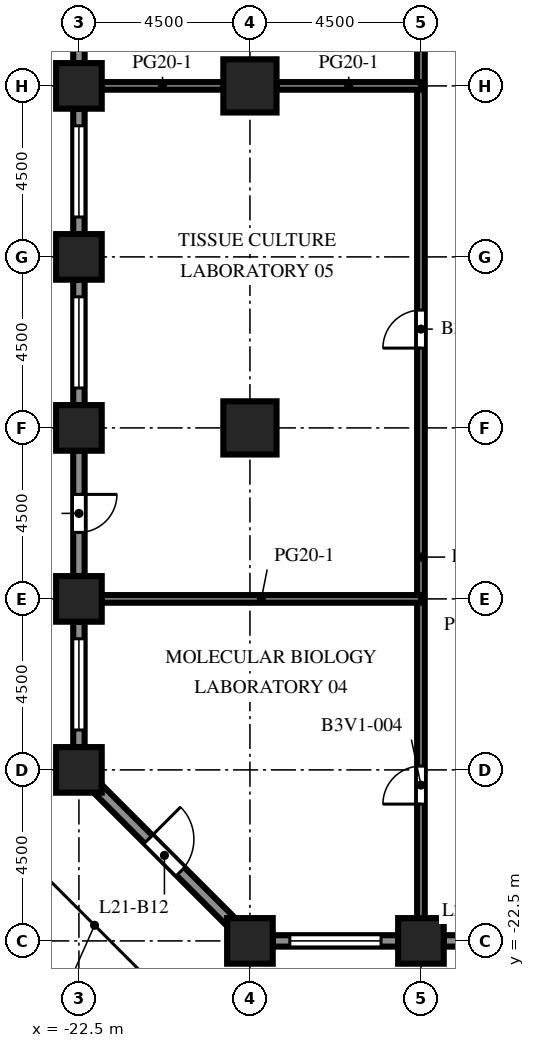
"""IFC4 building model, lengths in metres.
Left out: names, types, materials, properties, quantities, classifications, styles, units other than length and angle.
Written with IfcOpenShell. Run it as: python <this file> out.ifc"""

import sys

from ifc_helpers import new_model, si_unit, direction, frame, frame_2d, origin, origin_2d, place, context, subcontext, project, spatial, rectangle, extrude, element, fill, save


model = new_model("IFC4")
c1 = context("Model", 3, precision=1e-05, world=origin(), true_north=direction((0.0, 1.0)))
c2 = subcontext(c1, "Body", "Model", "MODEL_VIEW")
j1 = project(units=[si_unit("LENGTHUNIT", "METRE"), si_unit("PLANEANGLEUNIT", "RADIAN")], contexts=[c1])
p1 = place(None, origin())
s1 = spatial("IfcSite", under=j1, at=p1, CompositionType="ELEMENT")
p2 = place(p1, origin())
s2 = spatial("IfcBuilding", under=s1, at=p2, CompositionType="ELEMENT")
p3 = place(p2, frame((0.0, 0.0, 94.3)))
s3 = spatial("IfcBuildingStorey", under=s2, at=p3, CompositionType="ELEMENT", Elevation=94.3)
for number, where, z_axis, x_axis in (
    (1, (-22.5, -18.0, 0.0), (0.0, 0.0, 1.0), (1.0, 0.0, 0.0)),
    (2, (-22.5, -13.5, 0.0), (0.0, 0.0, 1.0), (1.0, 0.0, 0.0)),
    (3, (-22.5, -9.0, 0.0), (0.0, 0.0, 1.0), (1.0, 0.0, 0.0)),
    (4, (-22.5, -4.5, 0.0), (0.0, 0.0, 1.0), (1.0, 0.0, 0.0)),
    (5, (-22.5, 0.0, 0.0), (0.0, 0.0, 1.0), (1.0, 0.0, 0.0)),
    (6, (-18.0, -22.5, 0.0), (0.0, 0.0, 1.0), (1.0, 0.0, 0.0)),
    (7, (-13.5, -22.5, 0.0), (0.0, 0.0, 1.0), (1.0, 0.0, 0.0)),
):
    element("IfcColumn", number, at=place(p3, frame(where, z_axis=z_axis, x_axis=x_axis)), inside=s3, PredefinedType="COLUMN", context=c2, shape_type="SweptSolid", body=[
        extrude(rectangle(XDim=1.2, YDim=1.2, at=origin_2d()), origin(), (0.0, 0.0, 1.0), 4.1),
    ])
for number, where, z_axis, x_axis in (
    (8, (-18.0, -9.0, 0.0), (0.0, 0.0, 1.0), (1.0, 0.0, 0.0)),
    (9, (-18.0, 0.0, 0.0), (0.0, 0.0, 1.0), (1.0, 0.0, 0.0)),
):
    element("IfcColumn", number, at=place(p3, frame(where, z_axis=z_axis, x_axis=x_axis)), inside=s3, PredefinedType="COLUMN", context=c2, shape_type="SweptSolid", body=[
        extrude(rectangle(XDim=1.4, YDim=1.4, at=origin_2d()), origin(), (0.0, 0.0, 1.0), 4.1),
    ])
p4 = place(p3, frame((-14.1, -22.5, 0.0), z_axis=(0.0, 0.0, 1.0), x_axis=(-1.0, 0.0, 0.0)))
e10 = element("IfcWall", 10, at=p4, inside=s3, PredefinedType="SOLIDWALL", context=c2, shape_type="SweptSolid", body=[
    extrude(rectangle(XDim=3.3, YDim=0.3, at=frame_2d((1.65, 0.0))), origin(), (0.0, 0.0, 1.0), 2.75),
])
p5 = place(p4, frame((0.45, 0.0, 0.8)))
e11 = element("IfcOpeningElement", 11, at=p5, cuts=e10, PredefinedType="OPENING", context=c2, shape_type="SweptSolid", body=[
    extrude(rectangle(XDim=2.4, YDim=1.7, at=frame_2d((1.2, 0.85))), frame((0.0, 0.16, 0.0), z_axis=(0.0, -1.0, 0.0), x_axis=(1.0, 0.0, 0.0)), (0.0, 0.0, 1.0), 0.32),
])
p6 = place(p3, frame((-9.6, -22.5, 0.0), z_axis=(0.0, 0.0, 1.0), x_axis=(-1.0, 0.0, 0.0)))
e12 = element("IfcWall", 12, at=p6, inside=s3, PredefinedType="SOLIDWALL", context=c2, shape_type="SweptSolid", body=[
    extrude(rectangle(XDim=3.3, YDim=0.3, at=frame_2d((1.65, 0.0))), origin(), (0.0, 0.0, 1.0), 2.75),
])
p7 = place(p6, frame((1.15, 0.0, 0.0)))
e13 = element("IfcOpeningElement", 13, at=p7, cuts=e12, PredefinedType="OPENING", context=c2, shape_type="SweptSolid", body=[
    extrude(rectangle(XDim=1.0, YDim=2.2, at=frame_2d((0.5, 1.1))), frame((0.0, 0.16, 0.0), z_axis=(0.0, -1.0, 0.0), x_axis=(1.0, 0.0, 0.0)), (0.0, 0.0, 1.0), 0.32),
])
p8 = place(p3, frame((-22.5, 0.6, 0.0), z_axis=(0.0, 0.0, 1.0), x_axis=(0.0, 1.0, 0.0)))
e14 = element("IfcWall", 14, at=p8, inside=s3, PredefinedType="SOLIDWALL", context=c2, shape_type="SweptSolid", body=[
    extrude(rectangle(XDim=3.3, YDim=0.3, at=frame_2d((1.65, 0.0))), origin(), (0.0, 0.0, 1.0), 2.75),
])
p9 = place(p8, frame((0.45, 0.0, 0.8)))
e15 = element("IfcOpeningElement", 15, at=p9, cuts=e14, PredefinedType="OPENING", context=c2, shape_type="SweptSolid", body=[
    extrude(rectangle(XDim=2.4, YDim=1.7, at=frame_2d((1.2, 0.85))), frame((0.0, 0.16, 0.0), z_axis=(0.0, -1.0, 0.0), x_axis=(1.0, 0.0, 0.0)), (0.0, 0.0, 1.0), 0.32),
])
p10 = place(p3, frame((-22.5, -3.9, 0.0), z_axis=(0.0, 0.0, 1.0), x_axis=(0.0, 1.0, 0.0)))
e16 = element("IfcWall", 16, at=p10, inside=s3, PredefinedType="SOLIDWALL", context=c2, shape_type="SweptSolid", body=[
    extrude(rectangle(XDim=3.3, YDim=0.3, at=frame_2d((1.65, 0.0))), origin(), (0.0, 0.0, 1.0), 2.75),
])
p11 = place(p10, frame((0.45, 0.0, 0.8)))
e17 = element("IfcOpeningElement", 17, at=p11, cuts=e16, PredefinedType="OPENING", context=c2, shape_type="SweptSolid", body=[
    extrude(rectangle(XDim=2.4, YDim=1.7, at=frame_2d((1.2, 0.85))), frame((0.0, 0.16, 0.0), z_axis=(0.0, -1.0, 0.0), x_axis=(1.0, 0.0, 0.0)), (0.0, 0.0, 1.0), 0.32),
])
p12 = place(p3, frame((-22.5, -8.4, 0.0), z_axis=(0.0, 0.0, 1.0), x_axis=(0.0, 1.0, 0.0)))
e18 = element("IfcWall", 18, at=p12, inside=s3, PredefinedType="SOLIDWALL", context=c2, shape_type="SweptSolid", body=[
    extrude(rectangle(XDim=3.3, YDim=0.3, at=frame_2d((1.65, 0.0))), origin(), (0.0, 0.0, 1.0), 2.75),
])
p13 = place(p12, frame((0.45, 0.0, 0.8)))
e19 = element("IfcOpeningElement", 19, at=p13, cuts=e18, PredefinedType="OPENING", context=c2, shape_type="SweptSolid", body=[
    extrude(rectangle(XDim=2.4, YDim=1.7, at=frame_2d((1.2, 0.85))), frame((0.0, 0.16, 0.0), z_axis=(0.0, -1.0, 0.0), x_axis=(1.0, 0.0, 0.0)), (0.0, 0.0, 1.0), 0.32),
])
p14 = place(p3, frame((-22.5, -12.9, 0.0), z_axis=(0.0, 0.0, 1.0), x_axis=(0.0, 1.0, 0.0)))
e20 = element("IfcWall", 20, at=p14, inside=s3, PredefinedType="SOLIDWALL", context=c2, shape_type="SweptSolid", body=[
    extrude(rectangle(XDim=3.3, YDim=0.3, at=frame_2d((1.65, 0.0))), origin(), (0.0, 0.0, 1.0), 2.75),
])
p15 = place(p14, frame((1.15, 0.0, 0.0)))
e21 = element("IfcOpeningElement", 21, at=p15, cuts=e20, PredefinedType="OPENING", context=c2, shape_type="SweptSolid", body=[
    extrude(rectangle(XDim=1.0, YDim=2.2, at=frame_2d((0.5, 1.1))), frame((0.0, 0.16, 0.0), z_axis=(0.0, -1.0, 0.0), x_axis=(1.0, 0.0, 0.0)), (0.0, 0.0, 1.0), 0.32),
])
p16 = place(p3, frame((-22.5, -17.4, 0.0), z_axis=(0.0, 0.0, 1.0), x_axis=(0.0, 1.0, 0.0)))
e22 = element("IfcWall", 22, at=p16, inside=s3, PredefinedType="SOLIDWALL", context=c2, shape_type="SweptSolid", body=[
    extrude(rectangle(XDim=3.3, YDim=0.3, at=frame_2d((1.65, 0.0))), origin(), (0.0, 0.0, 1.0), 2.75),
])
p17 = place(p16, frame((0.45, 0.0, 0.8)))
e23 = element("IfcOpeningElement", 23, at=p17, cuts=e22, PredefinedType="OPENING", context=c2, shape_type="SweptSolid", body=[
    extrude(rectangle(XDim=2.4, YDim=1.7, at=frame_2d((1.2, 0.85))), frame((0.0, 0.16, 0.0), z_axis=(0.0, -1.0, 0.0), x_axis=(1.0, 0.0, 0.0)), (0.0, 0.0, 1.0), 0.32),
])
p18 = place(p3, frame((-18.494, -22.006, 0.0), z_axis=(0.0, 0.0, 1.0), x_axis=(-0.707106781187, 0.707106781187, 0.0)))
e24 = element("IfcWall", 24, at=p18, inside=s3, PredefinedType="SOLIDWALL", context=c2, shape_type="SweptSolid", body=[
    extrude(rectangle(XDim=4.967, YDim=0.3, at=frame_2d((2.483, 0.0))), origin(), (0.0, 0.0, 1.0), 2.75),
])
p19 = place(p18, frame((1.884, 0.0, 0.0)))
e25 = element("IfcOpeningElement", 25, at=p19, cuts=e24, PredefinedType="OPENING", context=c2, shape_type="SweptSolid", body=[
    extrude(rectangle(XDim=1.2, YDim=2.2, at=frame_2d((0.6, 1.1))), frame((0.0, 0.16, 0.0), z_axis=(0.0, -1.0, 0.0), x_axis=(1.0, 0.0, 0.0)), (0.0, 0.0, 1.0), 0.32),
])
p20 = place(p3, frame((-13.5, -21.9, 0.0), z_axis=(0.0, 0.0, 1.0), x_axis=(0.0, 1.0, 0.0)))
e26 = element("IfcWall", 26, at=p20, inside=s3, PredefinedType="PARTITIONING", context=c2, shape_type="SweptSolid", body=[
    extrude(rectangle(XDim=52.8, YDim=0.2, at=frame_2d((26.4, 0.0))), origin(), (0.0, 0.0, 1.0), 3.65),
])
p21 = place(p20, frame((3.0, 0.0, 0.0)))
e27 = element("IfcOpeningElement", 27, at=p21, cuts=e26, PredefinedType="OPENING", context=c2, shape_type="SweptSolid", body=[
    extrude(rectangle(XDim=1.0, YDim=2.1, at=frame_2d((0.5, 1.05))), frame((0.0, 0.11, 0.0), z_axis=(0.0, -1.0, 0.0), x_axis=(1.0, 0.0, 0.0)), (0.0, 0.0, 1.0), 0.22),
])
p22 = place(p20, frame((15.0, 0.0, 0.0)))
e28 = element("IfcOpeningElement", 28, at=p22, cuts=e26, PredefinedType="OPENING", context=c2, shape_type="SweptSolid", body=[
    extrude(rectangle(XDim=1.0, YDim=2.1, at=frame_2d((0.5, 1.05))), frame((0.0, 0.11, 0.0), z_axis=(0.0, -1.0, 0.0), x_axis=(1.0, 0.0, 0.0)), (0.0, 0.0, 1.0), 0.22),
])
p23 = place(p20, frame((25.75, 0.0, 0.0)))
e29 = element("IfcOpeningElement", 29, at=p23, cuts=e26, PredefinedType="OPENING", context=c2, shape_type="SweptSolid", body=[
    extrude(rectangle(XDim=1.0, YDim=2.1, at=frame_2d((0.5, 1.05))), frame((0.0, 0.11, 0.0), z_axis=(0.0, -1.0, 0.0), x_axis=(1.0, 0.0, 0.0)), (0.0, 0.0, 1.0), 0.22),
])
p24 = place(p20, frame((34.5, 0.0, 0.0)))
e30 = element("IfcOpeningElement", 30, at=p24, cuts=e26, PredefinedType="OPENING", context=c2, shape_type="SweptSolid", body=[
    extrude(rectangle(XDim=1.0, YDim=2.1, at=frame_2d((0.5, 1.05))), frame((0.0, 0.11, 0.0), z_axis=(0.0, -1.0, 0.0), x_axis=(1.0, 0.0, 0.0)), (0.0, 0.0, 1.0), 0.22),
])
p25 = place(p20, frame((41.5, 0.0, 0.0)))
e31 = element("IfcOpeningElement", 31, at=p25, cuts=e26, PredefinedType="OPENING", context=c2, shape_type="SweptSolid", body=[
    extrude(rectangle(XDim=1.0, YDim=2.1, at=frame_2d((0.5, 1.05))), frame((0.0, 0.11, 0.0), z_axis=(0.0, -1.0, 0.0), x_axis=(1.0, 0.0, 0.0)), (0.0, 0.0, 1.0), 0.22),
])
p26 = place(p20, frame((48.25, 0.0, 0.0)))
e32 = element("IfcOpeningElement", 32, at=p26, cuts=e26, PredefinedType="OPENING", context=c2, shape_type="SweptSolid", body=[
    extrude(rectangle(XDim=1.0, YDim=2.1, at=frame_2d((0.5, 1.05))), frame((0.0, 0.11, 0.0), z_axis=(0.0, -1.0, 0.0), x_axis=(1.0, 0.0, 0.0)), (0.0, 0.0, 1.0), 0.22),
])
p27 = place(p3, frame((-21.9, -13.5, 0.0), z_axis=(0.0, 0.0, 1.0), x_axis=(1.0, 0.0, 0.0)))
e33 = element("IfcWall", 33, at=p27, inside=s3, PredefinedType="PARTITIONING", context=c2, shape_type="SweptSolid", body=[
    extrude(rectangle(XDim=8.4, YDim=0.2, at=frame_2d((4.2, 0.0))), origin(), (0.0, 0.0, 1.0), 3.65),
])
p28 = place(p3, frame((-21.9, 0.0, 0.0), z_axis=(0.0, 0.0, 1.0), x_axis=(1.0, 0.0, 0.0)))
e34 = element("IfcWall", 34, at=p28, inside=s3, PredefinedType="PARTITIONING", context=c2, shape_type="SweptSolid", body=[
    extrude(rectangle(XDim=3.2, YDim=0.2, at=frame_2d((1.6, 0.0))), origin(), (0.0, 0.0, 1.0), 3.65),
])
p29 = place(p3, frame((-17.3, 0.0, 0.0), z_axis=(0.0, 0.0, 1.0), x_axis=(1.0, 0.0, 0.0)))
e35 = element("IfcWall", 35, at=p29, inside=s3, PredefinedType="PARTITIONING", context=c2, shape_type="SweptSolid", body=[
    extrude(rectangle(XDim=3.8, YDim=0.2, at=frame_2d((1.9, 0.0))), origin(), (0.0, 0.0, 1.0), 3.65),
])
p30 = place(p5, origin())
e36 = element("IfcWindow", 36, at=p30, inside=s3, PartitioningType="SINGLE_PANEL", PredefinedType="WINDOW", context=c2, shape_type="SweptSolid", body=[
    extrude(rectangle(XDim=2.4, YDim=1.7, at=frame_2d((1.2, 0.85))), frame((0.0, 0.03, 0.0), z_axis=(0.0, -1.0, 0.0), x_axis=(1.0, 0.0, 0.0)), (0.0, 0.0, 1.0), 0.06),
])
fill(e11, e36)
p31 = place(p11, origin())
e37 = element("IfcWindow", 37, at=p31, inside=s3, PartitioningType="SINGLE_PANEL", PredefinedType="WINDOW", context=c2, shape_type="SweptSolid", body=[
    extrude(rectangle(XDim=2.4, YDim=1.7, at=frame_2d((1.2, 0.85))), frame((0.0, 0.03, 0.0), z_axis=(0.0, -1.0, 0.0), x_axis=(1.0, 0.0, 0.0)), (0.0, 0.0, 1.0), 0.06),
])
fill(e17, e37)
p32 = place(p13, origin())
e38 = element("IfcWindow", 38, at=p32, inside=s3, PartitioningType="SINGLE_PANEL", PredefinedType="WINDOW", context=c2, shape_type="SweptSolid", body=[
    extrude(rectangle(XDim=2.4, YDim=1.7, at=frame_2d((1.2, 0.85))), frame((0.0, 0.03, 0.0), z_axis=(0.0, -1.0, 0.0), x_axis=(1.0, 0.0, 0.0)), (0.0, 0.0, 1.0), 0.06),
])
fill(e19, e38)
p33 = place(p15, origin())
e39 = element("IfcDoor", 39, at=p33, inside=s3, OperationType="SINGLE_SWING_RIGHT", PredefinedType="DOOR", context=c2, shape_type="SweptSolid", body=[
    extrude(rectangle(XDim=1.0, YDim=2.2, at=frame_2d((0.5, 1.1))), frame((0.0, 0.025, 0.0), z_axis=(0.0, -1.0, 0.0), x_axis=(1.0, 0.0, 0.0)), (0.0, 0.0, 1.0), 0.05),
])
fill(e21, e39)
p34 = place(p17, origin())
e40 = element("IfcWindow", 40, at=p34, inside=s3, PartitioningType="SINGLE_PANEL", PredefinedType="WINDOW", context=c2, shape_type="SweptSolid", body=[
    extrude(rectangle(XDim=2.4, YDim=1.7, at=frame_2d((1.2, 0.85))), frame((0.0, 0.03, 0.0), z_axis=(0.0, -1.0, 0.0), x_axis=(1.0, 0.0, 0.0)), (0.0, 0.0, 1.0), 0.06),
])
fill(e23, e40)
p35 = place(p19, origin())
e41 = element("IfcDoor", 41, at=p35, inside=s3, OperationType="SINGLE_SWING_RIGHT", PredefinedType="DOOR", context=c2, shape_type="SweptSolid", body=[
    extrude(rectangle(XDim=1.2, YDim=2.2, at=frame_2d((0.6, 1.1))), frame((0.0, 0.025, 0.0), z_axis=(0.0, -1.0, 0.0), x_axis=(1.0, 0.0, 0.0)), (0.0, 0.0, 1.0), 0.05),
])
fill(e25, e41)
p36 = place(p21, origin())
e42 = element("IfcDoor", 42, at=p36, inside=s3, OperationType="SINGLE_SWING_LEFT", PredefinedType="DOOR", context=c2, shape_type="SweptSolid", body=[
    extrude(rectangle(XDim=1.0, YDim=2.1, at=frame_2d((0.5, 1.05))), frame((0.0, 0.025, 0.0), z_axis=(0.0, -1.0, 0.0), x_axis=(1.0, 0.0, 0.0)), (0.0, 0.0, 1.0), 0.05),
])
fill(e27, e42)
p37 = place(p22, origin())
e43 = element("IfcDoor", 43, at=p37, inside=s3, OperationType="SINGLE_SWING_LEFT", PredefinedType="DOOR", context=c2, shape_type="SweptSolid", body=[
    extrude(rectangle(XDim=1.0, YDim=2.1, at=frame_2d((0.5, 1.05))), frame((0.0, 0.025, 0.0), z_axis=(0.0, -1.0, 0.0), x_axis=(1.0, 0.0, 0.0)), (0.0, 0.0, 1.0), 0.05),
])
fill(e28, e43)
save(model, sys.argv[1])
